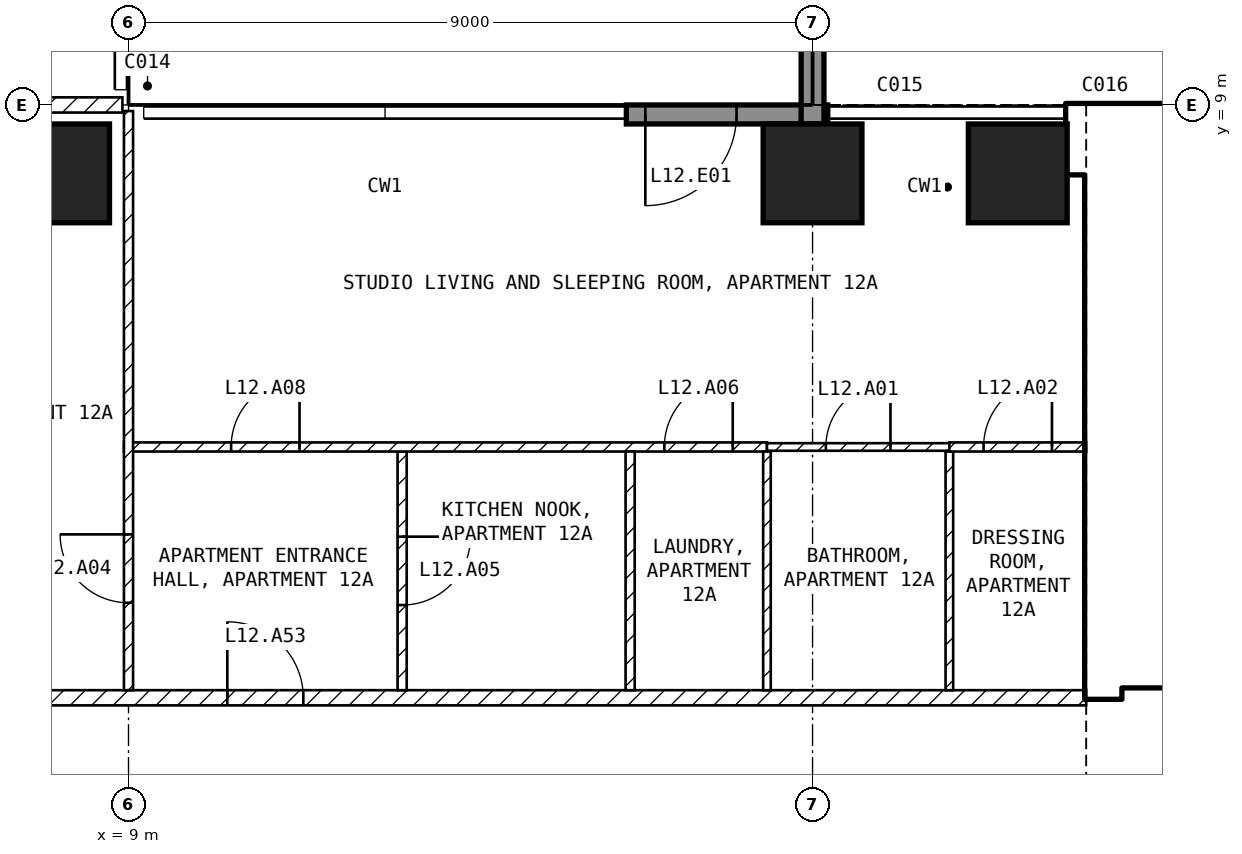
"""IFC4 building model, lengths in metres.
Left out: names, types, materials, properties, quantities, classifications, styles, units other than length and angle.
Written with IfcOpenShell. Run it as: python <this file> out.ifc"""

import sys

from ifc_helpers import new_model, si_unit, direction, frame, frame_2d, origin, origin_2d, place, context, subcontext, project, spatial, rectangle, extrude, element, fill, save


model = new_model("IFC4")
c1 = context("Model", 3, precision=1e-05, world=origin(), true_north=direction((0.0, 1.0)))
c2 = subcontext(c1, "Body", "Model", "MODEL_VIEW")
j1 = project(units=[si_unit("LENGTHUNIT", "METRE"), si_unit("PLANEANGLEUNIT", "RADIAN")], contexts=[c1])
p1 = place(None, origin())
s1 = spatial("IfcSite", under=j1, at=p1, CompositionType="ELEMENT")
p2 = place(p1, origin())
s2 = spatial("IfcBuilding", under=s1, at=p2, CompositionType="ELEMENT")
p3 = place(p2, frame((0.0, 0.0, 61.0)))
s3 = spatial("IfcBuildingStorey", under=s2, at=p3, CompositionType="ELEMENT", Elevation=61.0)
for number, where, z_axis, x_axis in (
    (1, (8.1, 8.1, -0.25), (0.0, 0.0, 1.0), (1.0, 0.0, 0.0)),
    (2, (18.0, 8.1, -0.25), (0.0, 0.0, 1.0), (1.0, 0.0, 0.0)),
    (3, (20.7, 8.1, -0.25), (0.0, 0.0, 1.0), (1.0, 0.0, 0.0)),
):
    element("IfcColumn", number, at=place(p3, frame(where, z_axis=z_axis, x_axis=x_axis)), inside=s3, PredefinedType="COLUMN", context=c2, shape_type="SweptSolid", body=[
        extrude(rectangle(XDim=1.3, YDim=1.3, at=origin_2d()), origin(), (0.0, 0.0, 1.0), 3.5),
    ])
p4 = place(p3, frame((18.2, 8.875, 0.0), z_axis=(0.0, 0.0, 1.0), x_axis=(-1.0, 0.0, 0.0)))
e4 = element("IfcWall", 4, at=p4, inside=s3, PredefinedType="SOLIDWALL", context=c2, shape_type="SweptSolid", body=[
    extrude(rectangle(XDim=2.65, YDim=0.25, at=frame_2d((1.325, 0.0))), origin(), (0.0, 0.0, 1.0), 3.25),
])
p5 = place(p4, frame((1.2, 0.0, 0.0)))
e5 = element("IfcOpeningElement", 5, at=p5, cuts=e4, PredefinedType="OPENING", context=c2, shape_type="SweptSolid", body=[
    extrude(rectangle(XDim=1.2, YDim=2.4, at=frame_2d((0.6, 1.2))), frame((0.0, 0.135, 0.0), z_axis=(0.0, -1.0, 0.0), x_axis=(1.0, 0.0, 0.0)), (0.0, 0.0, 1.0), 0.27),
])
p6 = place(p3, frame((18.0, 8.75, 0.0), z_axis=(0.0, 0.0, 1.0), x_axis=(0.0, 1.0, 0.0)))
e6 = element("IfcWall", 6, at=p6, inside=s3, PredefinedType="SOLIDWALL", context=c2, shape_type="SweptSolid", body=[
    extrude(rectangle(XDim=2.95, YDim=0.3, at=frame_2d((1.475, 0.0))), origin(), (0.0, 0.0, 1.0), 3.25),
])
p7 = place(p3, frame((21.35, 8.55, 0.0), z_axis=(0.0, 0.0, 1.0), x_axis=(1.0, 0.0, 0.0)))
e7 = element("IfcWall", 7, at=p7, inside=s3, PredefinedType="SHEAR", context=c2, shape_type="SweptSolid", body=[
    extrude(rectangle(XDim=10.15, YDim=0.9, at=frame_2d((5.075, 0.0))), origin(), (0.0, 0.0, 1.0), 3.25),
])
p8 = place(p3, frame((21.825, 1.2, 0.0), z_axis=(0.0, 0.0, 1.0), x_axis=(0.0, 1.0, 0.0)))
e8 = element("IfcWall", 8, at=p8, inside=s3, PredefinedType="SHEAR", context=c2, shape_type="SweptSolid", body=[
    extrude(rectangle(XDim=6.9, YDim=0.45, at=frame_2d((3.45, 0.0))), origin(), (0.0, 0.0, 1.0), 3.25),
])
p9 = place(p3, frame((22.05, 1.45, 0.0), z_axis=(0.0, 0.0, 1.0), x_axis=(1.0, 0.0, 0.0)))
e9 = element("IfcWall", 9, at=p9, inside=s3, PredefinedType="SOLIDWALL", context=c2, shape_type="SweptSolid", body=[
    extrude(rectangle(XDim=13.05, YDim=0.2, at=frame_2d((6.525, 0.0))), origin(), (0.0, 0.0, 1.0), 3.25),
])
p10 = place(p9, frame((0.75, 0.0, 0.0)))
e10 = element("IfcOpeningElement", 10, at=p10, cuts=e9, PredefinedType="OPENING", context=c2, shape_type="SweptSolid", body=[
    extrude(rectangle(XDim=1.0, YDim=2.1, at=frame_2d((0.5, 1.05))), frame((0.0, 0.11, 0.0), z_axis=(0.0, -1.0, 0.0), x_axis=(1.0, 0.0, 0.0)), (0.0, 0.0, 1.0), 0.22),
])
p11 = place(p9, frame((3.25, 0.0, 0.0)))
e11 = element("IfcOpeningElement", 11, at=p11, cuts=e9, PredefinedType="OPENING", context=c2, shape_type="SweptSolid", body=[
    extrude(rectangle(XDim=1.0, YDim=2.1, at=frame_2d((0.5, 1.05))), frame((0.0, 0.11, 0.0), z_axis=(0.0, -1.0, 0.0), x_axis=(1.0, 0.0, 0.0)), (0.0, 0.0, 1.0), 0.22),
])
p12 = place(p3, frame((22.05, 5.15, 0.0), z_axis=(0.0, 0.0, 1.0), x_axis=(1.0, 0.0, 0.0)))
e12 = element("IfcWall", 12, at=p12, inside=s3, PredefinedType="SOLIDWALL", context=c2, shape_type="SweptSolid", body=[
    extrude(rectangle(XDim=6.3, YDim=0.2, at=frame_2d((3.15, 0.0))), origin(), (0.0, 0.0, 1.0), 3.25),
])
p13 = place(p12, frame((0.2, 0.0, 0.0)))
e13 = element("IfcOpeningElement", 13, at=p13, cuts=e12, PredefinedType="OPENING", context=c2, shape_type="SweptSolid", body=[
    extrude(rectangle(XDim=1.0, YDim=2.1, at=frame_2d((0.5, 1.05))), frame((0.0, 0.11, 0.0), z_axis=(0.0, -1.0, 0.0), x_axis=(1.0, 0.0, 0.0)), (0.0, 0.0, 1.0), 0.22),
])
p14 = place(p3, frame((1.1, 1.2, 0.0), z_axis=(0.0, 0.0, 1.0), x_axis=(1.0, 0.0, 0.0)))
e14 = element("IfcWall", 14, at=p14, inside=s3, PredefinedType="PARTITIONING", context=c2, shape_type="SweptSolid", body=[
    extrude(rectangle(XDim=20.5, YDim=0.2, at=frame_2d((10.25, 0.0))), origin(), (0.0, 0.0, 1.0), 3.25),
])
p15 = place(p14, frame((9.2, 0.0, 0.0)))
e15 = element("IfcOpeningElement", 15, at=p15, cuts=e14, PredefinedType="OPENING", context=c2, shape_type="SweptSolid", body=[
    extrude(rectangle(XDim=1.0, YDim=2.1, at=frame_2d((0.5, 1.05))), frame((0.0, 0.11, 0.0), z_axis=(0.0, -1.0, 0.0), x_axis=(1.0, 0.0, 0.0)), (0.0, 0.0, 1.0), 0.22),
])
p16 = place(p3, frame((-8.92, 9.0, 0.0), z_axis=(0.0, 0.0, 1.0), x_axis=(1.0, 0.0, 0.0)))
e16 = element("IfcWall", 16, at=p16, inside=s3, PredefinedType="PARTITIONING", context=c2, shape_type="SweptSolid", body=[
    extrude(rectangle(XDim=17.84, YDim=0.2, at=frame_2d((8.92, 0.0))), origin(), (0.0, 0.0, 1.0), 3.25),
])
p17 = place(p16, frame((8.42, 0.0, 0.0)))
e17 = element("IfcOpeningElement", 17, at=p17, cuts=e16, PredefinedType="OPENING", context=c2, shape_type="SweptSolid", body=[
    extrude(rectangle(XDim=1.0, YDim=2.1, at=frame_2d((0.5, 1.05))), frame((0.0, 0.11, 0.0), z_axis=(0.0, -1.0, 0.0), x_axis=(1.0, 0.0, 0.0)), (0.0, 0.0, 1.0), 0.22),
])
p18 = place(p3, frame((12.6, 4.44, 0.0), z_axis=(0.0, 0.0, 1.0), x_axis=(0.0, -1.0, 0.0)))
e18 = element("IfcWall", 18, at=p18, inside=s3, PredefinedType="PARTITIONING", context=c2, shape_type="SweptSolid", body=[
    extrude(rectangle(XDim=3.14, YDim=0.12, at=frame_2d((1.57, 0.0))), origin(), (0.0, 0.0, 1.0), 3.25),
])
p19 = place(p18, frame((1.12, 0.0, 0.0)))
e19 = element("IfcOpeningElement", 19, at=p19, cuts=e18, PredefinedType="OPENING", context=c2, shape_type="SweptSolid", body=[
    extrude(rectangle(XDim=0.9, YDim=2.1, at=frame_2d((0.45, 1.05))), frame((0.0, 0.07, 0.0), z_axis=(0.0, -1.0, 0.0), x_axis=(1.0, 0.0, 0.0)), (0.0, 0.0, 1.0), 0.14),
])
p20 = place(p3, frame((8.94, 4.5, 0.0), z_axis=(0.0, 0.0, 1.0), x_axis=(1.0, 0.0, 0.0)))
e20 = element("IfcWall", 20, at=p20, inside=s3, PredefinedType="PARTITIONING", context=c2, shape_type="SweptSolid", body=[
    extrude(rectangle(XDim=8.46, YDim=0.12, at=frame_2d((4.23, 0.0))), origin(), (0.0, 0.0, 1.0), 3.25),
])
p21 = place(p20, frame((7.11, 0.0, 0.0)))
e21 = element("IfcOpeningElement", 21, at=p21, cuts=e20, PredefinedType="OPENING", context=c2, shape_type="SweptSolid", body=[
    extrude(rectangle(XDim=0.9, YDim=2.1, at=frame_2d((0.45, 1.05))), frame((0.0, 0.07, 0.0), z_axis=(0.0, -1.0, 0.0), x_axis=(1.0, 0.0, 0.0)), (0.0, 0.0, 1.0), 0.14),
])
p22 = place(p20, frame((1.41, 0.0, 0.0)))
e22 = element("IfcOpeningElement", 22, at=p22, cuts=e20, PredefinedType="OPENING", context=c2, shape_type="SweptSolid", body=[
    extrude(rectangle(XDim=0.9, YDim=2.1, at=frame_2d((0.45, 1.05))), frame((0.0, 0.07, 0.0), z_axis=(0.0, -1.0, 0.0), x_axis=(1.0, 0.0, 0.0)), (0.0, 0.0, 1.0), 0.14),
])
p23 = place(p3, frame((9.0, 1.3, 0.0), z_axis=(0.0, 0.0, 1.0), x_axis=(0.0, 1.0, 0.0)))
e23 = element("IfcWall", 23, at=p23, inside=s3, PredefinedType="PARTITIONING", context=c2, shape_type="SweptSolid", body=[
    extrude(rectangle(XDim=7.62, YDim=0.12, at=frame_2d((3.81, 0.0))), origin(), (0.0, 0.0, 1.0), 3.25),
])
p24 = place(p23, frame((1.15, 0.0, 0.0)))
e24 = element("IfcOpeningElement", 24, at=p24, cuts=e23, PredefinedType="OPENING", context=c2, shape_type="SweptSolid", body=[
    extrude(rectangle(XDim=0.9, YDim=2.1, at=frame_2d((0.45, 1.05))), frame((0.0, 0.07, 0.0), z_axis=(0.0, -1.0, 0.0), x_axis=(1.0, 0.0, 0.0)), (0.0, 0.0, 1.0), 0.14),
])
p25 = place(p3, frame((15.6, 4.44, 0.0), z_axis=(0.0, 0.0, 1.0), x_axis=(0.0, -1.0, 0.0)))
e25 = element("IfcWall", 25, at=p25, inside=s3, PredefinedType="PARTITIONING", context=c2, shape_type="SweptSolid", body=[
    extrude(rectangle(XDim=3.14, YDim=0.12, at=frame_2d((1.57, 0.0))), origin(), (0.0, 0.0, 1.0), 3.25),
])
for number, where, z_axis, x_axis in (
    (26, (17.4, 4.44, 0.0), (0.0, 0.0, 1.0), (0.0, -1.0, 0.0)),
    (27, (19.8, 4.44, 0.0), (0.0, 0.0, 1.0), (0.0, -1.0, 0.0)),
):
    element("IfcWall", number, at=place(p3, frame(where, z_axis=z_axis, x_axis=x_axis)), inside=s3, PredefinedType="PARTITIONING", context=c2, shape_type="SweptSolid", body=[
        extrude(rectangle(XDim=3.14, YDim=0.1, at=frame_2d((1.57, 0.0))), origin(), (0.0, 0.0, 1.0), 3.25),
    ])
p26 = place(p3, frame((17.4, 4.5, 0.0), z_axis=(0.0, 0.0, 1.0), x_axis=(1.0, 0.0, 0.0)))
e28 = element("IfcWall", 28, at=p26, inside=s3, PredefinedType="PARTITIONING", context=c2, shape_type="SweptSolid", body=[
    extrude(rectangle(XDim=2.4, YDim=0.1, at=frame_2d((1.2, 0.0))), origin(), (0.0, 0.0, 1.0), 3.25),
])
p27 = place(p26, frame((0.775, 0.0, 0.0)))
e29 = element("IfcOpeningElement", 29, at=p27, cuts=e28, PredefinedType="OPENING", context=c2, shape_type="SweptSolid", body=[
    extrude(rectangle(XDim=0.85, YDim=2.1, at=frame_2d((0.425, 1.05))), frame((0.0, 0.06, 0.0), z_axis=(0.0, -1.0, 0.0), x_axis=(1.0, 0.0, 0.0)), (0.0, 0.0, 1.0), 0.12),
])
p28 = place(p3, frame((19.8, 4.5, 0.0), z_axis=(0.0, 0.0, 1.0), x_axis=(1.0, 0.0, 0.0)))
e30 = element("IfcWall", 30, at=p28, inside=s3, PredefinedType="PARTITIONING", context=c2, shape_type="SweptSolid", body=[
    extrude(rectangle(XDim=1.8, YDim=0.12, at=frame_2d((0.9, 0.0))), origin(), (0.0, 0.0, 1.0), 3.25),
])
p29 = place(p28, frame((0.45, 0.0, 0.0)))
e31 = element("IfcOpeningElement", 31, at=p29, cuts=e30, PredefinedType="OPENING", context=c2, shape_type="SweptSolid", body=[
    extrude(rectangle(XDim=0.9, YDim=2.1, at=frame_2d((0.45, 1.05))), frame((0.0, 0.07, 0.0), z_axis=(0.0, -1.0, 0.0), x_axis=(1.0, 0.0, 0.0)), (0.0, 0.0, 1.0), 0.14),
])
p30 = place(p5, origin())
e32 = element("IfcDoor", 32, at=p30, inside=s3, OperationType="SINGLE_SWING_RIGHT", PredefinedType="DOOR", context=c2, shape_type="SweptSolid", body=[
    extrude(rectangle(XDim=1.2, YDim=2.4, at=frame_2d((0.6, 1.2))), frame((0.0, 0.025, 0.0), z_axis=(0.0, -1.0, 0.0), x_axis=(1.0, 0.0, 0.0)), (0.0, 0.0, 1.0), 0.05),
])
fill(e5, e32)
p31 = place(p13, origin())
e33 = element("IfcDoor", 33, at=p31, inside=s3, OperationType="SINGLE_SWING_LEFT", PredefinedType="DOOR", context=c2, shape_type="SweptSolid", body=[
    extrude(rectangle(XDim=1.0, YDim=2.1, at=frame_2d((0.5, 1.05))), frame((0.0, 0.025, 0.0), z_axis=(0.0, -1.0, 0.0), x_axis=(1.0, 0.0, 0.0)), (0.0, 0.0, 1.0), 0.05),
])
fill(e13, e33)
p32 = place(p27, origin())
e34 = element("IfcDoor", 34, at=p32, inside=s3, OperationType="SINGLE_SWING_RIGHT", PredefinedType="DOOR", context=c2, shape_type="SweptSolid", body=[
    extrude(rectangle(XDim=0.85, YDim=2.1, at=frame_2d((0.425, 1.05))), frame((0.0, 0.025, 0.0), z_axis=(0.0, -1.0, 0.0), x_axis=(1.0, 0.0, 0.0)), (0.0, 0.0, 1.0), 0.05),
])
fill(e29, e34)
p33 = place(p29, origin())
e35 = element("IfcDoor", 35, at=p33, inside=s3, OperationType="SINGLE_SWING_RIGHT", PredefinedType="DOOR", context=c2, shape_type="SweptSolid", body=[
    extrude(rectangle(XDim=0.9, YDim=2.1, at=frame_2d((0.45, 1.05))), frame((0.0, 0.025, 0.0), z_axis=(0.0, -1.0, 0.0), x_axis=(1.0, 0.0, 0.0)), (0.0, 0.0, 1.0), 0.05),
])
fill(e31, e35)
p34 = place(p24, origin())
e36 = element("IfcDoor", 36, at=p34, inside=s3, OperationType="SINGLE_SWING_RIGHT", PredefinedType="DOOR", context=c2, shape_type="SweptSolid", body=[
    extrude(rectangle(XDim=0.9, YDim=2.1, at=frame_2d((0.45, 1.05))), frame((0.0, 0.025, 0.0), z_axis=(0.0, -1.0, 0.0), x_axis=(1.0, 0.0, 0.0)), (0.0, 0.0, 1.0), 0.05),
])
fill(e24, e36)
p35 = place(p19, origin())
e37 = element("IfcDoor", 37, at=p35, inside=s3, OperationType="SINGLE_SWING_LEFT", PredefinedType="DOOR", context=c2, shape_type="SweptSolid", body=[
    extrude(rectangle(XDim=0.9, YDim=2.1, at=frame_2d((0.45, 1.05))), frame((0.0, 0.025, 0.0), z_axis=(0.0, -1.0, 0.0), x_axis=(1.0, 0.0, 0.0)), (0.0, 0.0, 1.0), 0.05),
])
fill(e19, e37)
p36 = place(p21, origin())
e38 = element("IfcDoor", 38, at=p36, inside=s3, OperationType="SINGLE_SWING_RIGHT", PredefinedType="DOOR", context=c2, shape_type="SweptSolid", body=[
    extrude(rectangle(XDim=0.9, YDim=2.1, at=frame_2d((0.45, 1.05))), frame((0.0, 0.025, 0.0), z_axis=(0.0, -1.0, 0.0), x_axis=(1.0, 0.0, 0.0)), (0.0, 0.0, 1.0), 0.05),
])
fill(e21, e38)
p37 = place(p22, origin())
e39 = element("IfcDoor", 39, at=p37, inside=s3, OperationType="SINGLE_SWING_RIGHT", PredefinedType="DOOR", context=c2, shape_type="SweptSolid", body=[
    extrude(rectangle(XDim=0.9, YDim=2.1, at=frame_2d((0.45, 1.05))), frame((0.0, 0.025, 0.0), z_axis=(0.0, -1.0, 0.0), x_axis=(1.0, 0.0, 0.0)), (0.0, 0.0, 1.0), 0.05),
])
fill(e22, e39)
p38 = place(p15, origin())
e40 = element("IfcDoor", 40, at=p38, inside=s3, OperationType="SINGLE_SWING_LEFT", PredefinedType="DOOR", context=c2, shape_type="SweptSolid", body=[
    extrude(rectangle(XDim=1.0, YDim=2.1, at=frame_2d((0.5, 1.05))), frame((0.0, 0.025, 0.0), z_axis=(0.0, -1.0, 0.0), x_axis=(1.0, 0.0, 0.0)), (0.0, 0.0, 1.0), 0.05),
])
fill(e15, e40)
save(model, sys.argv[1])
